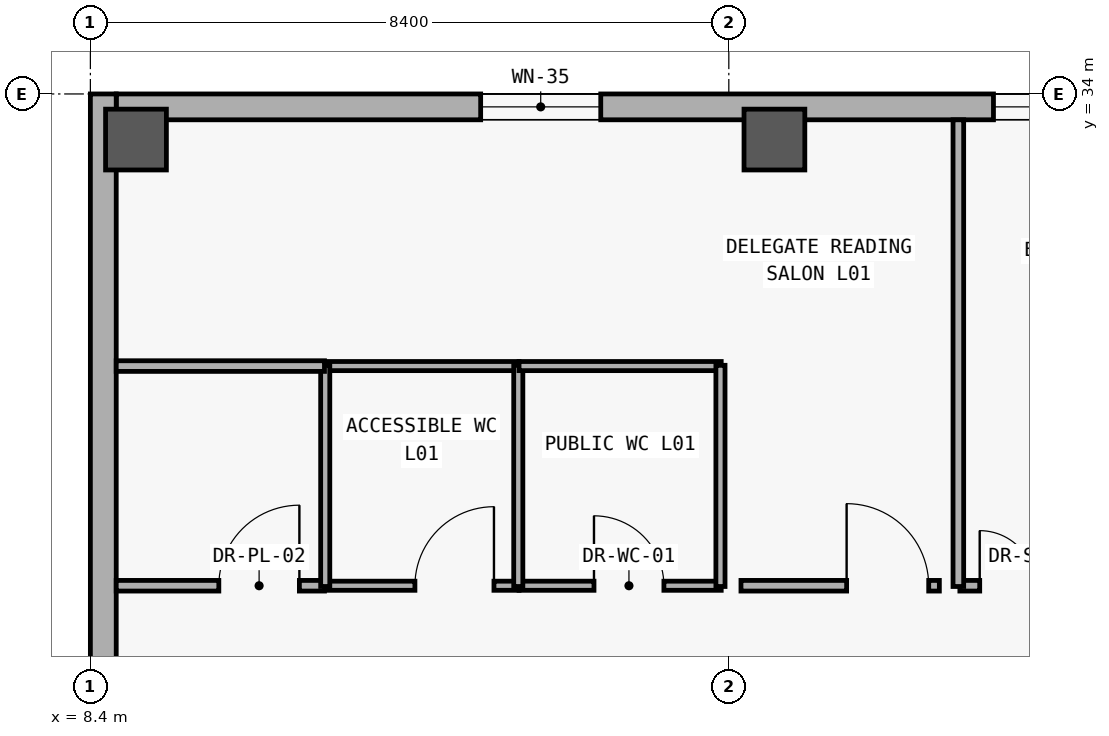
"""IFC4 building model, lengths in metres.
Left out: names, types, materials, properties, quantities, classifications, styles, units other than length and angle.
Written with IfcOpenShell. Run it as: python <this file> out.ifc"""

import sys

from ifc_helpers import new_model, si_unit, direction, frame, frame_2d, origin, origin_2d, place, context, subcontext, project, spatial, rectangle, extrude, element, fill, save


model = new_model("IFC4")
c1 = context("Model", 3, precision=1e-05, world=origin(), true_north=direction((0.0, 1.0)))
c2 = subcontext(c1, "Body", "Model", "MODEL_VIEW")
j1 = project(units=[si_unit("LENGTHUNIT", "METRE"), si_unit("PLANEANGLEUNIT", "RADIAN")], contexts=[c1])
p1 = place(None, origin())
s1 = spatial("IfcSite", under=j1, at=p1, CompositionType="ELEMENT")
p2 = place(p1, origin())
s2 = spatial("IfcBuilding", under=s1, at=p2, CompositionType="ELEMENT")
p3 = place(p2, frame((0.0, 0.0, 5.4)))
s3 = spatial("IfcBuildingStorey", under=s2, at=p3, CompositionType="ELEMENT", Elevation=5.4)
for number, where, z_axis, x_axis in (
    (1, (9.0, 33.4, 0.0), (0.0, 0.0, 1.0), (1.0, 0.0, 0.0)),
    (2, (17.4, 33.4, 0.0), (0.0, 0.0, 1.0), (1.0, 0.0, 0.0)),
):
    element("IfcColumn", number, at=place(p3, frame(where, z_axis=z_axis, x_axis=x_axis)), inside=s3, PredefinedType="COLUMN", context=c2, shape_type="SweptSolid", body=[
        extrude(rectangle(XDim=0.8, YDim=0.8, at=origin_2d()), origin(), (0.0, 0.0, 1.0), 5.4),
    ])
p4 = place(p3, frame((8.74, 33.83, 0.0), z_axis=(0.0, 0.0, 1.0), x_axis=(1.0, 0.0, 0.0)))
e3 = element("IfcWall", 3, at=p4, inside=s3, PredefinedType="SOLIDWALL", context=c2, shape_type="SweptSolid", body=[
    extrude(rectangle(XDim=83.32, YDim=0.34, at=frame_2d((41.66, 0.0))), origin(), (0.0, 0.0, 1.0), 5.1),
])
p5 = place(p4, frame((4.795, 0.0, 0.85)))
e4 = element("IfcOpeningElement", 4, at=p5, cuts=e3, PredefinedType="OPENING", context=c2, shape_type="SweptSolid", body=[
    extrude(rectangle(XDim=1.58, YDim=1.85, at=frame_2d((0.79, 0.925))), frame((0.0, 0.18, 0.0), z_axis=(0.0, -1.0, 0.0), x_axis=(1.0, 0.0, 0.0)), (0.0, 0.0, 1.0), 0.36),
])
p6 = place(p4, frame((11.542, 0.0, 0.85)))
e5 = element("IfcOpeningElement", 5, at=p6, cuts=e3, PredefinedType="OPENING", context=c2, shape_type="SweptSolid", body=[
    extrude(rectangle(XDim=3.1, YDim=2.2, at=frame_2d((1.55, 1.1))), frame((0.0, 0.18, 0.0), z_axis=(0.0, -1.0, 0.0), x_axis=(1.0, 0.0, 0.0)), (0.0, 0.0, 1.0), 0.36),
])
p7 = place(p4, frame((16.471, 0.0, 0.85)))
e6 = element("IfcOpeningElement", 6, at=p7, cuts=e3, PredefinedType="OPENING", context=c2, shape_type="SweptSolid", body=[
    extrude(rectangle(XDim=1.25, YDim=1.45, at=frame_2d((0.625, 0.725))), frame((0.0, 0.18, 0.0), z_axis=(0.0, -1.0, 0.0), x_axis=(1.0, 0.0, 0.0)), (0.0, 0.0, 1.0), 0.36),
])
p8 = place(p4, frame((20.425, 0.0, 0.85)))
e7 = element("IfcOpeningElement", 7, at=p8, cuts=e3, PredefinedType="OPENING", context=c2, shape_type="SweptSolid", body=[
    extrude(rectangle(XDim=1.35, YDim=1.55, at=frame_2d((0.675, 0.775))), frame((0.0, 0.18, 0.0), z_axis=(0.0, -1.0, 0.0), x_axis=(1.0, 0.0, 0.0)), (0.0, 0.0, 1.0), 0.36),
])
p9 = place(p4, frame((24.379, 0.0, 0.85)))
e8 = element("IfcOpeningElement", 8, at=p9, cuts=e3, PredefinedType="OPENING", context=c2, shape_type="SweptSolid", body=[
    extrude(rectangle(XDim=1.45, YDim=1.65, at=frame_2d((0.725, 0.825))), frame((0.0, 0.18, 0.0), z_axis=(0.0, -1.0, 0.0), x_axis=(1.0, 0.0, 0.0)), (0.0, 0.0, 1.0), 0.36),
])
p10 = place(p4, frame((28.332, 0.0, 0.85)))
e9 = element("IfcOpeningElement", 9, at=p10, cuts=e3, PredefinedType="OPENING", context=c2, shape_type="SweptSolid", body=[
    extrude(rectangle(XDim=1.55, YDim=1.65, at=frame_2d((0.775, 0.825))), frame((0.0, 0.18, 0.0), z_axis=(0.0, -1.0, 0.0), x_axis=(1.0, 0.0, 0.0)), (0.0, 0.0, 1.0), 0.36),
])
p11 = place(p4, frame((32.261, 0.0, 0.85)))
e10 = element("IfcOpeningElement", 10, at=p11, cuts=e3, PredefinedType="OPENING", context=c2, shape_type="SweptSolid", body=[
    extrude(rectangle(XDim=1.7, YDim=2.0, at=frame_2d((0.85, 1.0))), frame((0.0, 0.18, 0.0), z_axis=(0.0, -1.0, 0.0), x_axis=(1.0, 0.0, 0.0)), (0.0, 0.0, 1.0), 0.36),
])
p12 = place(p4, frame((35.965, 0.0, 0.85)))
e11 = element("IfcOpeningElement", 11, at=p12, cuts=e3, PredefinedType="OPENING", context=c2, shape_type="SweptSolid", body=[
    extrude(rectangle(XDim=2.3, YDim=2.05, at=frame_2d((1.15, 1.025))), frame((0.0, 0.18, 0.0), z_axis=(0.0, -1.0, 0.0), x_axis=(1.0, 0.0, 0.0)), (0.0, 0.0, 1.0), 0.36),
])
p13 = place(p4, frame((39.744, 0.0, 0.85)))
e12 = element("IfcOpeningElement", 12, at=p13, cuts=e3, PredefinedType="OPENING", context=c2, shape_type="SweptSolid", body=[
    extrude(rectangle(XDim=2.75, YDim=2.1, at=frame_2d((1.375, 1.05))), frame((0.0, 0.18, 0.0), z_axis=(0.0, -1.0, 0.0), x_axis=(1.0, 0.0, 0.0)), (0.0, 0.0, 1.0), 0.36),
])
p14 = place(p4, frame((44.533, 0.0, 0.85)))
e13 = element("IfcOpeningElement", 13, at=p14, cuts=e3, PredefinedType="OPENING", context=c2, shape_type="SweptSolid", body=[
    extrude(rectangle(XDim=1.18, YDim=1.5, at=frame_2d((0.59, 0.75))), frame((0.0, 0.18, 0.0), z_axis=(0.0, -1.0, 0.0), x_axis=(1.0, 0.0, 0.0)), (0.0, 0.0, 1.0), 0.36),
])
p15 = place(p4, frame((48.487, 0.0, 0.85)))
e14 = element("IfcOpeningElement", 14, at=p15, cuts=e3, PredefinedType="OPENING", context=c2, shape_type="SweptSolid", body=[
    extrude(rectangle(XDim=1.28, YDim=1.6, at=frame_2d((0.64, 0.8))), frame((0.0, 0.18, 0.0), z_axis=(0.0, -1.0, 0.0), x_axis=(1.0, 0.0, 0.0)), (0.0, 0.0, 1.0), 0.36),
])
p16 = place(p4, frame((52.441, 0.0, 0.85)))
e15 = element("IfcOpeningElement", 15, at=p16, cuts=e3, PredefinedType="OPENING", context=c2, shape_type="SweptSolid", body=[
    extrude(rectangle(XDim=1.38, YDim=1.7, at=frame_2d((0.69, 0.85))), frame((0.0, 0.18, 0.0), z_axis=(0.0, -1.0, 0.0), x_axis=(1.0, 0.0, 0.0)), (0.0, 0.0, 1.0), 0.36),
])
p17 = place(p4, frame((56.395, 0.0, 0.85)))
e16 = element("IfcOpeningElement", 16, at=p17, cuts=e3, PredefinedType="OPENING", context=c2, shape_type="SweptSolid", body=[
    extrude(rectangle(XDim=1.48, YDim=1.8, at=frame_2d((0.74, 0.9))), frame((0.0, 0.18, 0.0), z_axis=(0.0, -1.0, 0.0), x_axis=(1.0, 0.0, 0.0)), (0.0, 0.0, 1.0), 0.36),
])
p18 = place(p4, frame((60.349, 0.0, 0.85)))
e17 = element("IfcOpeningElement", 17, at=p18, cuts=e3, PredefinedType="OPENING", context=c2, shape_type="SweptSolid", body=[
    extrude(rectangle(XDim=1.58, YDim=1.85, at=frame_2d((0.79, 0.925))), frame((0.0, 0.18, 0.0), z_axis=(0.0, -1.0, 0.0), x_axis=(1.0, 0.0, 0.0)), (0.0, 0.0, 1.0), 0.36),
])
p19 = place(p4, frame((64.302, 0.0, 0.85)))
e18 = element("IfcOpeningElement", 18, at=p19, cuts=e3, PredefinedType="OPENING", context=c2, shape_type="SweptSolid", body=[
    extrude(rectangle(XDim=1.68, YDim=1.9, at=frame_2d((0.84, 0.95))), frame((0.0, 0.18, 0.0), z_axis=(0.0, -1.0, 0.0), x_axis=(1.0, 0.0, 0.0)), (0.0, 0.0, 1.0), 0.36),
])
p20 = place(p4, frame((68.256, 0.0, 0.85)))
e19 = element("IfcOpeningElement", 19, at=p20, cuts=e3, PredefinedType="OPENING", context=c2, shape_type="SweptSolid", body=[
    extrude(rectangle(XDim=1.78, YDim=1.95, at=frame_2d((0.89, 0.975))), frame((0.0, 0.18, 0.0), z_axis=(0.0, -1.0, 0.0), x_axis=(1.0, 0.0, 0.0)), (0.0, 0.0, 1.0), 0.36),
])
p21 = place(p4, frame((72.21, 0.0, 0.85)))
e20 = element("IfcOpeningElement", 20, at=p21, cuts=e3, PredefinedType="OPENING", context=c2, shape_type="SweptSolid", body=[
    extrude(rectangle(XDim=1.88, YDim=1.95, at=frame_2d((0.94, 0.975))), frame((0.0, 0.18, 0.0), z_axis=(0.0, -1.0, 0.0), x_axis=(1.0, 0.0, 0.0)), (0.0, 0.0, 1.0), 0.36),
])
p22 = place(p4, frame((76.129, 0.0, 0.85)))
e21 = element("IfcOpeningElement", 21, at=p22, cuts=e3, PredefinedType="OPENING", context=c2, shape_type="SweptSolid", body=[
    extrude(rectangle(XDim=2.05, YDim=1.95, at=frame_2d((1.025, 0.975))), frame((0.0, 0.18, 0.0), z_axis=(0.0, -1.0, 0.0), x_axis=(1.0, 0.0, 0.0)), (0.0, 0.0, 1.0), 0.36),
])
p23 = place(p4, frame((80.068, 0.0, 0.85)))
e22 = element("IfcOpeningElement", 22, at=p23, cuts=e3, PredefinedType="OPENING", context=c2, shape_type="SweptSolid", body=[
    extrude(rectangle(XDim=2.18, YDim=1.95, at=frame_2d((1.09, 0.975))), frame((0.0, 0.18, 0.0), z_axis=(0.0, -1.0, 0.0), x_axis=(1.0, 0.0, 0.0)), (0.0, 0.0, 1.0), 0.36),
])
p24 = place(p3, frame((8.57, 6.0, 0.0), z_axis=(0.0, 0.0, 1.0), x_axis=(0.0, 1.0, 0.0)))
e23 = element("IfcWall", 23, at=p24, inside=s3, PredefinedType="SOLIDWALL", context=c2, shape_type="SweptSolid", body=[
    extrude(rectangle(XDim=28.0, YDim=0.34, at=frame_2d((14.0, 0.0))), origin(), (0.0, 0.0, 1.0), 5.1),
])
p25 = place(p24, frame((4.5, 0.0, 0.95)))
e24 = element("IfcOpeningElement", 24, at=p25, cuts=e23, PredefinedType="OPENING", context=c2, shape_type="SweptSolid", body=[
    extrude(rectangle(XDim=1.6, YDim=1.6, at=frame_2d((0.8, 0.8))), frame((0.0, 0.18, 0.0), z_axis=(0.0, -1.0, 0.0), x_axis=(1.0, 0.0, 0.0)), (0.0, 0.0, 1.0), 0.36),
])
p26 = place(p3, frame((11.48, 27.53, 0.0), z_axis=(0.0, 0.0, 1.0), x_axis=(1.0, 0.0, 0.0)))
e25 = element("IfcWall", 25, at=p26, inside=s3, PredefinedType="PARTITIONING", context=c2, shape_type="SweptSolid", body=[
    extrude(rectangle(XDim=2.56, YDim=0.12, at=frame_2d((1.28, 0.0))), origin(), (0.0, 0.0, 1.0), 4.18),
])
p27 = place(p26, frame((1.19, 0.0, 0.0)))
e26 = element("IfcOpeningElement", 26, at=p27, cuts=e25, PredefinedType="OPENING", context=c2, shape_type="SweptSolid", body=[
    extrude(rectangle(XDim=1.04, YDim=2.15, at=frame_2d((0.52, 1.075))), frame((0.0, 0.07, 0.0), z_axis=(0.0, -1.0, 0.0), x_axis=(1.0, 0.0, 0.0)), (0.0, 0.0, 1.0), 0.14),
])
p28 = place(p3, frame((14.04, 27.53, 0.0), z_axis=(0.0, 0.0, 1.0), x_axis=(1.0, 0.0, 0.0)))
e27 = element("IfcWall", 27, at=p28, inside=s3, PredefinedType="PARTITIONING", context=c2, shape_type="SweptSolid", body=[
    extrude(rectangle(XDim=2.66, YDim=0.12, at=frame_2d((1.33, 0.0))), origin(), (0.0, 0.0, 1.0), 4.18),
])
p29 = place(p28, frame((0.986, 0.0, 0.0)))
e28 = element("IfcOpeningElement", 28, at=p29, cuts=e27, PredefinedType="OPENING", context=c2, shape_type="SweptSolid", body=[
    extrude(rectangle(XDim=0.92, YDim=2.15, at=frame_2d((0.46, 1.075))), frame((0.0, 0.07, 0.0), z_axis=(0.0, -1.0, 0.0), x_axis=(1.0, 0.0, 0.0)), (0.0, 0.0, 1.0), 0.14),
])
p30 = place(p3, frame((8.74, 27.53, 0.0), z_axis=(0.0, 0.0, 1.0), x_axis=(1.0, 0.0, 0.0)))
e29 = element("IfcWall", 29, at=p30, inside=s3, PredefinedType="PARTITIONING", context=c2, shape_type="SweptSolid", body=[
    extrude(rectangle(XDim=2.74, YDim=0.14, at=frame_2d((1.37, 0.0))), origin(), (0.0, 0.0, 1.0), 4.18),
])
p31 = place(p30, frame((1.35, 0.0, 0.0)))
e30 = element("IfcOpeningElement", 30, at=p31, cuts=e29, PredefinedType="OPENING", context=c2, shape_type="SweptSolid", body=[
    extrude(rectangle(XDim=1.06, YDim=2.2, at=frame_2d((0.53, 1.1))), frame((0.0, 0.08, 0.0), z_axis=(0.0, -1.0, 0.0), x_axis=(1.0, 0.0, 0.0)), (0.0, 0.0, 1.0), 0.16),
])
p32 = place(p3, frame((16.96, 27.53, 0.0), z_axis=(0.0, 0.0, 1.0), x_axis=(1.0, 0.0, 0.0)))
e31 = element("IfcWall", 31, at=p32, inside=s3, PredefinedType="PARTITIONING", context=c2, shape_type="SweptSolid", body=[
    extrude(rectangle(XDim=2.61, YDim=0.14, at=frame_2d((1.305, 0.0))), origin(), (0.0, 0.0, 1.0), 4.18),
])
p33 = place(p32, frame((1.39, 0.0, 0.0)))
e32 = element("IfcOpeningElement", 32, at=p33, cuts=e31, PredefinedType="OPENING", context=c2, shape_type="SweptSolid", body=[
    extrude(rectangle(XDim=1.08, YDim=2.25, at=frame_2d((0.54, 1.125))), frame((0.0, 0.08, 0.0), z_axis=(0.0, -1.0, 0.0), x_axis=(1.0, 0.0, 0.0)), (0.0, 0.0, 1.0), 0.16),
])
p34 = place(p3, frame((19.84, 27.53, 0.0), z_axis=(0.0, 0.0, 1.0), x_axis=(1.0, 0.0, 0.0)))
e33 = element("IfcWall", 33, at=p34, inside=s3, PredefinedType="PARTITIONING", context=c2, shape_type="SweptSolid", body=[
    extrude(rectangle(XDim=2.575, YDim=0.14, at=frame_2d((1.288, 0.0))), origin(), (0.0, 0.0, 1.0), 4.18),
])
p35 = place(p34, frame((0.261, 0.0, 0.0)))
e34 = element("IfcOpeningElement", 34, at=p35, cuts=e33, PredefinedType="OPENING", context=c2, shape_type="SweptSolid", body=[
    extrude(rectangle(XDim=1.45, YDim=2.3, at=frame_2d((0.725, 1.15))), frame((0.0, 0.08, 0.0), z_axis=(0.0, -1.0, 0.0), x_axis=(1.0, 0.0, 0.0)), (0.0, 0.0, 1.0), 0.16),
])
p36 = place(p3, frame((11.48, 30.42, 0.0), z_axis=(0.0, 0.0, 1.0), x_axis=(1.0, 0.0, 0.0)))
e35 = element("IfcWall", 35, at=p36, inside=s3, PredefinedType="PARTITIONING", context=c2, shape_type="SweptSolid", body=[
    extrude(rectangle(XDim=2.56, YDim=0.12, at=frame_2d((1.28, 0.0))), origin(), (0.0, 0.0, 1.0), 4.18),
])
for number, where, z_axis, x_axis in (
    (36, (11.49, 27.52, 0.0), (0.0, 0.0, 1.0), (0.0, 1.0, 0.0)),
    (37, (14.03, 27.52, 0.0), (0.0, 0.0, 1.0), (0.0, 1.0, 0.0)),
):
    element("IfcWall", number, at=place(p3, frame(where, z_axis=z_axis, x_axis=x_axis)), inside=s3, PredefinedType="PARTITIONING", context=c2, shape_type="SweptSolid", body=[
        extrude(rectangle(XDim=2.91, YDim=0.12, at=frame_2d((1.455, 0.0))), origin(), (0.0, 0.0, 1.0), 4.18),
    ])
p37 = place(p3, frame((14.04, 30.42, 0.0), z_axis=(0.0, 0.0, 1.0), x_axis=(1.0, 0.0, 0.0)))
e38 = element("IfcWall", 38, at=p37, inside=s3, PredefinedType="PARTITIONING", context=c2, shape_type="SweptSolid", body=[
    extrude(rectangle(XDim=2.66, YDim=0.12, at=frame_2d((1.33, 0.0))), origin(), (0.0, 0.0, 1.0), 4.18),
])
p38 = place(p3, frame((16.69, 27.52, 0.0), z_axis=(0.0, 0.0, 1.0), x_axis=(0.0, 1.0, 0.0)))
e39 = element("IfcWall", 39, at=p38, inside=s3, PredefinedType="PARTITIONING", context=c2, shape_type="SweptSolid", body=[
    extrude(rectangle(XDim=2.91, YDim=0.12, at=frame_2d((1.455, 0.0))), origin(), (0.0, 0.0, 1.0), 4.18),
])
p39 = place(p3, frame((8.74, 30.42, 0.0), z_axis=(0.0, 0.0, 1.0), x_axis=(1.0, 0.0, 0.0)))
e40 = element("IfcWall", 40, at=p39, inside=s3, PredefinedType="PARTITIONING", context=c2, shape_type="SweptSolid", body=[
    extrude(rectangle(XDim=2.74, YDim=0.14, at=frame_2d((1.37, 0.0))), origin(), (0.0, 0.0, 1.0), 4.18),
])
p40 = place(p3, frame((19.82, 27.52, 0.0), z_axis=(0.0, 0.0, 1.0), x_axis=(0.0, 1.0, 0.0)))
e41 = element("IfcWall", 41, at=p40, inside=s3, PredefinedType="PARTITIONING", context=c2, shape_type="SweptSolid", body=[
    extrude(rectangle(XDim=6.14, YDim=0.14, at=frame_2d((3.07, 0.0))), origin(), (0.0, 0.0, 1.0), 4.18),
])
p41 = place(p5, origin())
e42 = element("IfcWindow", 42, at=p41, inside=s3, PartitioningType="SINGLE_PANEL", PredefinedType="WINDOW", context=c2, shape_type="SweptSolid", body=[
    extrude(rectangle(XDim=1.58, YDim=1.85, at=frame_2d((0.79, 0.925))), frame((0.0, 0.03, 0.0), z_axis=(0.0, -1.0, 0.0), x_axis=(1.0, 0.0, 0.0)), (0.0, 0.0, 1.0), 0.06),
])
fill(e4, e42)
p42 = place(p6, origin())
e43 = element("IfcWindow", 43, at=p42, inside=s3, PartitioningType="SINGLE_PANEL", PredefinedType="WINDOW", context=c2, shape_type="SweptSolid", body=[
    extrude(rectangle(XDim=3.1, YDim=2.2, at=frame_2d((1.55, 1.1))), frame((0.0, 0.03, 0.0), z_axis=(0.0, -1.0, 0.0), x_axis=(1.0, 0.0, 0.0)), (0.0, 0.0, 1.0), 0.06),
])
fill(e5, e43)
p43 = place(p27, origin())
e44 = element("IfcDoor", 44, at=p43, inside=s3, OperationType="SINGLE_SWING_RIGHT", PredefinedType="DOOR", context=c2, shape_type="SweptSolid", body=[
    extrude(rectangle(XDim=1.04, YDim=2.15, at=frame_2d((0.52, 1.075))), frame((0.0, 0.025, 0.0), z_axis=(0.0, -1.0, 0.0), x_axis=(1.0, 0.0, 0.0)), (0.0, 0.0, 1.0), 0.05),
])
fill(e26, e44)
p44 = place(p29, origin())
e45 = element("IfcDoor", 45, at=p44, inside=s3, OperationType="SINGLE_SWING_LEFT", PredefinedType="DOOR", context=c2, shape_type="SweptSolid", body=[
    extrude(rectangle(XDim=0.92, YDim=2.15, at=frame_2d((0.46, 1.075))), frame((0.0, 0.025, 0.0), z_axis=(0.0, -1.0, 0.0), x_axis=(1.0, 0.0, 0.0)), (0.0, 0.0, 1.0), 0.05),
])
fill(e28, e45)
p45 = place(p31, origin())
e46 = element("IfcDoor", 46, at=p45, inside=s3, OperationType="SINGLE_SWING_RIGHT", PredefinedType="DOOR", context=c2, shape_type="SweptSolid", body=[
    extrude(rectangle(XDim=1.06, YDim=2.2, at=frame_2d((0.53, 1.1))), frame((0.0, 0.025, 0.0), z_axis=(0.0, -1.0, 0.0), x_axis=(1.0, 0.0, 0.0)), (0.0, 0.0, 1.0), 0.05),
])
fill(e30, e46)
p46 = place(p33, origin())
e47 = element("IfcDoor", 47, at=p46, inside=s3, OperationType="SINGLE_SWING_LEFT", PredefinedType="DOOR", context=c2, shape_type="SweptSolid", body=[
    extrude(rectangle(XDim=1.08, YDim=2.25, at=frame_2d((0.54, 1.125))), frame((0.0, 0.025, 0.0), z_axis=(0.0, -1.0, 0.0), x_axis=(1.0, 0.0, 0.0)), (0.0, 0.0, 1.0), 0.05),
])
fill(e32, e47)
p47 = place(p35, origin())
e48 = element("IfcDoor", 48, at=p47, inside=s3, OperationType="DOUBLE_DOOR_SINGLE_SWING", PredefinedType="DOOR", context=c2, shape_type="SweptSolid", body=[
    extrude(rectangle(XDim=1.45, YDim=2.3, at=frame_2d((0.725, 1.15))), frame((0.0, 0.025, 0.0), z_axis=(0.0, -1.0, 0.0), x_axis=(1.0, 0.0, 0.0)), (0.0, 0.0, 1.0), 0.05),
])
fill(e34, e48)
save(model, sys.argv[1])
